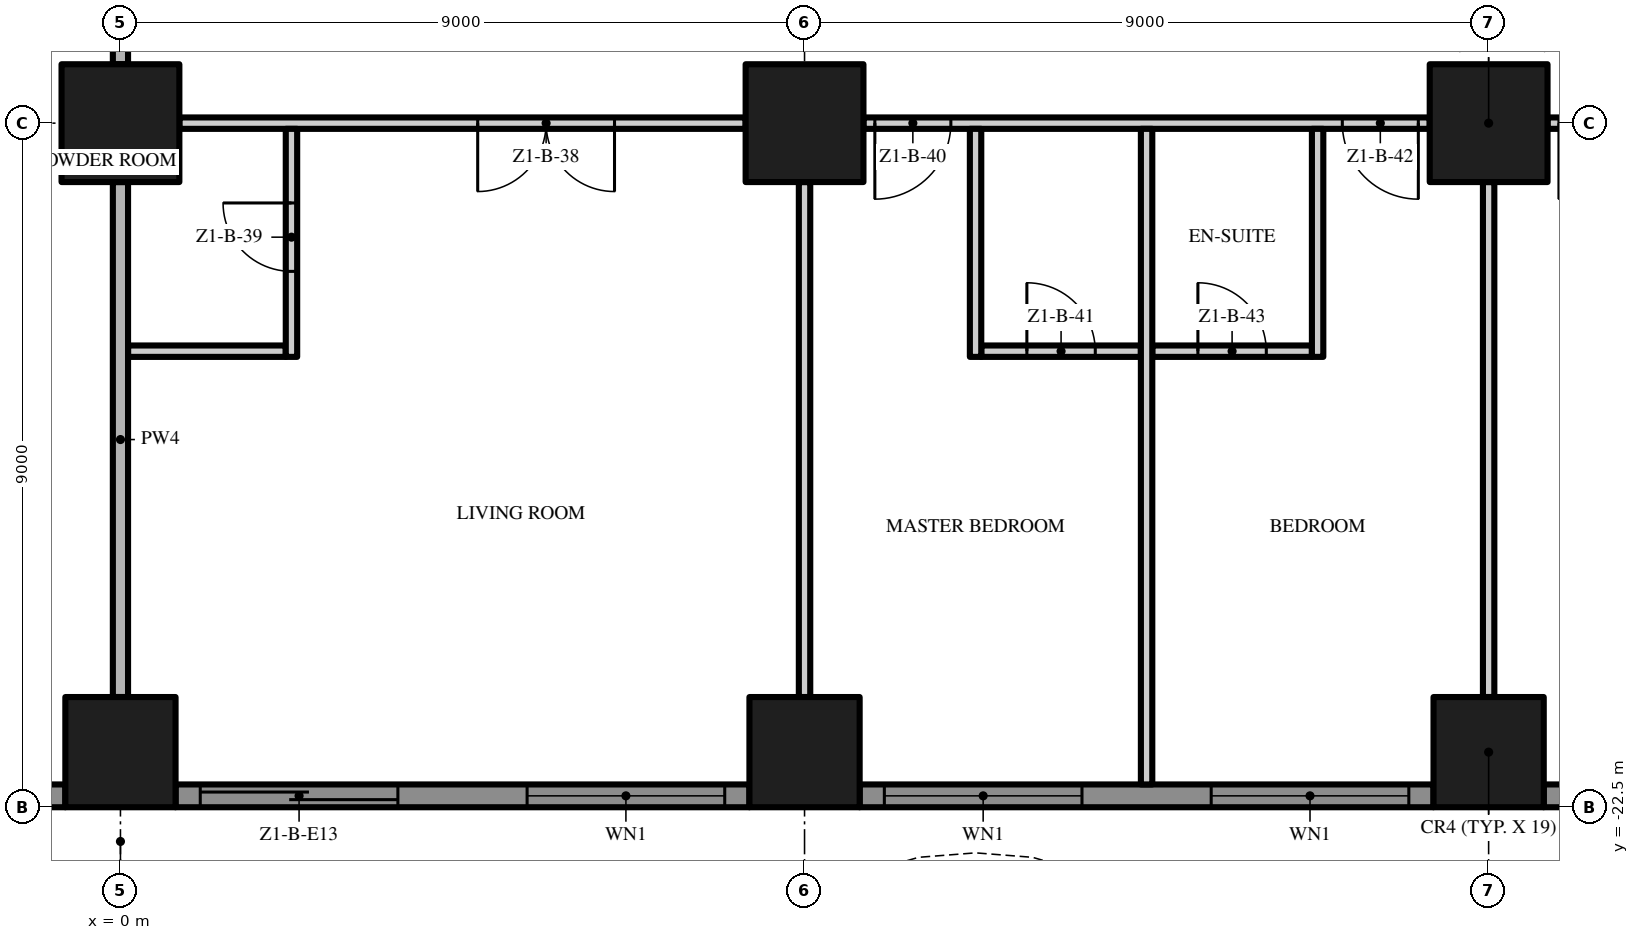
"""IFC4 building model, lengths in metres.
Left out: names, types, materials, properties, quantities, classifications, styles, units other than length and angle.
Written with IfcOpenShell. Run it as: python <this file> out.ifc"""

import sys

from ifc_helpers import new_model, si_unit, direction, frame, frame_2d, origin, origin_2d, place, context, subcontext, project, spatial, polyline, rectangle, outline, extrude, element, fill, save


model = new_model("IFC4")
c1 = context("Model", 3, precision=1e-05, world=origin(), true_north=direction((0.0, 1.0)))
c2 = subcontext(c1, "Body", "Model", "MODEL_VIEW")
j1 = project(units=[si_unit("LENGTHUNIT", "METRE"), si_unit("PLANEANGLEUNIT", "RADIAN")], contexts=[c1])
p1 = place(None, origin())
s1 = spatial("IfcSite", under=j1, at=p1, CompositionType="ELEMENT")
p2 = place(p1, origin())
s2 = spatial("IfcBuilding", under=s1, at=p2, CompositionType="ELEMENT")
p3 = place(p2, frame((0.0, 0.0, 30.2)))
s3 = spatial("IfcBuildingStorey", under=s2, at=p3, CompositionType="ELEMENT", Elevation=30.2)
p4 = place(p3, frame((0.0, -13.5, 0.0), z_axis=(0.0, 0.0, 1.0), x_axis=(1.0, 0.0, 0.0)))
e1 = element("IfcColumn", 1, at=p4, inside=s3, PredefinedType="COLUMN", context=c2, shape_type="SweptSolid", body=[
    extrude(rectangle(XDim=1.55, YDim=1.55, at=origin_2d()), origin(), (0.0, 0.0, 1.0), 3.5),
])
p5 = place(p3, frame((0.0, -21.775, 0.0), z_axis=(0.0, 0.0, 1.0), x_axis=(1.0, 0.0, 0.0)))
e2 = element("IfcColumn", 2, at=p5, inside=s3, PredefinedType="COLUMN", context=c2, shape_type="SweptSolid", body=[
    extrude(rectangle(XDim=1.45, YDim=1.45, at=origin_2d()), origin(), (0.0, 0.0, 1.0), 3.5),
])
p6 = place(p3, frame((18.0, -13.5, 0.0), z_axis=(0.0, 0.0, 1.0), x_axis=(1.0, 0.0, 0.0)))
e3 = element("IfcColumn", 3, at=p6, inside=s3, PredefinedType="COLUMN", context=c2, shape_type="SweptSolid", body=[
    extrude(rectangle(XDim=1.55, YDim=1.55, at=origin_2d()), origin(), (0.0, 0.0, 1.0), 3.5),
])
p7 = place(p3, frame((18.0, -21.775, 0.0), z_axis=(0.0, 0.0, 1.0), x_axis=(1.0, 0.0, 0.0)))
e4 = element("IfcColumn", 4, at=p7, inside=s3, PredefinedType="COLUMN", context=c2, shape_type="SweptSolid", body=[
    extrude(rectangle(XDim=1.45, YDim=1.45, at=origin_2d()), origin(), (0.0, 0.0, 1.0), 3.5),
])
p8 = place(p3, frame((9.0, -13.5, 0.0), z_axis=(0.0, 0.0, 1.0), x_axis=(1.0, 0.0, 0.0)))
e5 = element("IfcColumn", 5, at=p8, inside=s3, PredefinedType="COLUMN", context=c2, shape_type="SweptSolid", body=[
    extrude(rectangle(XDim=1.55, YDim=1.55, at=origin_2d()), origin(), (0.0, 0.0, 1.0), 3.5),
])
p9 = place(p3, frame((9.0, -21.775, 0.0), z_axis=(0.0, 0.0, 1.0), x_axis=(1.0, 0.0, 0.0)))
e6 = element("IfcColumn", 6, at=p9, inside=s3, PredefinedType="COLUMN", context=c2, shape_type="SweptSolid", body=[
    extrude(rectangle(XDim=1.45, YDim=1.45, at=origin_2d()), origin(), (0.0, 0.0, 1.0), 3.5),
])
p10 = place(p3, frame((-0.725, -22.35, 0.0), z_axis=(0.0, 0.0, 1.0), x_axis=(-1.0, 0.0, 0.0)))
e7 = element("IfcWall", 7, at=p10, inside=s3, PredefinedType="SOLIDWALL", context=c2, shape_type="SweptSolid", body=[
    extrude(rectangle(XDim=7.55, YDim=0.3, at=frame_2d((3.775, 0.0))), origin(), (0.0, 0.0, 1.0), 3.5),
])
p11 = place(p10, frame((4.625, 0.0, 0.45)))
e8 = element("IfcOpeningElement", 8, at=p11, cuts=e7, PredefinedType="OPENING", context=c2, shape_type="SweptSolid", body=[
    extrude(rectangle(XDim=2.6, YDim=2.65, at=frame_2d((1.3, 1.325))), frame((0.0, 0.16, 0.0), z_axis=(0.0, -1.0, 0.0), x_axis=(1.0, 0.0, 0.0)), (0.0, 0.0, 1.0), 0.32),
])
p12 = place(p10, frame((0.325, 0.0, 0.45)))
e9 = element("IfcOpeningElement", 9, at=p12, cuts=e7, PredefinedType="OPENING", context=c2, shape_type="SweptSolid", body=[
    extrude(rectangle(XDim=2.6, YDim=2.65, at=frame_2d((1.3, 1.325))), frame((0.0, 0.16, 0.0), z_axis=(0.0, -1.0, 0.0), x_axis=(1.0, 0.0, 0.0)), (0.0, 0.0, 1.0), 0.32),
])
p13 = place(p3, frame((8.275, -22.35, 0.0), z_axis=(0.0, 0.0, 1.0), x_axis=(-1.0, 0.0, 0.0)))
e10 = element("IfcWall", 10, at=p13, inside=s3, PredefinedType="SOLIDWALL", context=c2, shape_type="SweptSolid", body=[
    extrude(rectangle(XDim=7.55, YDim=0.3, at=frame_2d((3.775, 0.0))), origin(), (0.0, 0.0, 1.0), 3.5),
])
p14 = place(p13, frame((4.625, 0.0, 0.0)))
e11 = element("IfcOpeningElement", 11, at=p14, cuts=e10, PredefinedType="OPENING", context=c2, shape_type="SweptSolid", body=[
    extrude(rectangle(XDim=2.6, YDim=2.4, at=frame_2d((1.3, 1.2))), frame((0.0, 0.16, 0.0), z_axis=(0.0, -1.0, 0.0), x_axis=(1.0, 0.0, 0.0)), (0.0, 0.0, 1.0), 0.32),
])
p15 = place(p13, frame((0.325, 0.0, 0.45)))
e12 = element("IfcOpeningElement", 12, at=p15, cuts=e10, PredefinedType="OPENING", context=c2, shape_type="SweptSolid", body=[
    extrude(rectangle(XDim=2.6, YDim=2.65, at=frame_2d((1.3, 1.325))), frame((0.0, 0.16, 0.0), z_axis=(0.0, -1.0, 0.0), x_axis=(1.0, 0.0, 0.0)), (0.0, 0.0, 1.0), 0.32),
])
p16 = place(p3, frame((17.275, -22.35, 0.0), z_axis=(0.0, 0.0, 1.0), x_axis=(-1.0, 0.0, 0.0)))
e13 = element("IfcWall", 13, at=p16, inside=s3, PredefinedType="SOLIDWALL", context=c2, shape_type="SweptSolid", body=[
    extrude(rectangle(XDim=7.55, YDim=0.3, at=frame_2d((3.775, 0.0))), origin(), (0.0, 0.0, 1.0), 3.5),
])
p17 = place(p16, frame((4.625, 0.0, 0.45)))
e14 = element("IfcOpeningElement", 14, at=p17, cuts=e13, PredefinedType="OPENING", context=c2, shape_type="SweptSolid", body=[
    extrude(rectangle(XDim=2.6, YDim=2.65, at=frame_2d((1.3, 1.325))), frame((0.0, 0.16, 0.0), z_axis=(0.0, -1.0, 0.0), x_axis=(1.0, 0.0, 0.0)), (0.0, 0.0, 1.0), 0.32),
])
p18 = place(p16, frame((0.325, 0.0, 0.45)))
e15 = element("IfcOpeningElement", 15, at=p18, cuts=e13, PredefinedType="OPENING", context=c2, shape_type="SweptSolid", body=[
    extrude(rectangle(XDim=2.6, YDim=2.65, at=frame_2d((1.3, 1.325))), frame((0.0, 0.16, 0.0), z_axis=(0.0, -1.0, 0.0), x_axis=(1.0, 0.0, 0.0)), (0.0, 0.0, 1.0), 0.32),
])
p19 = place(p3, frame((22.5, -22.35, 0.0), z_axis=(0.0, 0.0, 1.0), x_axis=(-1.0, 0.0, 0.0)))
e16 = element("IfcWall", 16, at=p19, inside=s3, PredefinedType="SOLIDWALL", context=c2, shape_type="SweptSolid", body=[
    extrude(rectangle(XDim=3.775, YDim=0.3, at=frame_2d((1.887, 0.0))), origin(), (0.0, 0.0, 1.0), 3.5),
])
p20 = place(p19, frame((0.85, 0.0, 0.0)))
e17 = element("IfcOpeningElement", 17, at=p20, cuts=e16, PredefinedType="OPENING", context=c2, shape_type="SweptSolid", body=[
    extrude(rectangle(XDim=2.6, YDim=2.4, at=frame_2d((1.3, 1.2))), frame((0.0, 0.16, 0.0), z_axis=(0.0, -1.0, 0.0), x_axis=(1.0, 0.0, 0.0)), (0.0, 0.0, 1.0), 0.32),
])
p21 = place(p3, origin())
e18 = element("IfcWall", 18, at=p21, inside=s3, PredefinedType="USERDEFINED", context=c2, shape_type="SweptSolid", body=[
    extrude(outline(polyline([(-22.5, -24.3), (-21.0, -23.595), (-19.5, -23.159), (-18.75, -23.1), (-18.0, -23.159), (-16.5, -23.595), (-15.0, -24.3), (-13.5, -25.005), (-12.0, -25.441), (-11.25, -25.5), (-10.5, -25.441), (-9.0, -25.005), (-7.5, -24.3), (-6.0, -23.595), (-4.5, -23.159), (-3.75, -23.1), (-3.0, -23.159), (-1.5, -23.595), (0.0, -24.3), (1.5, -25.005), (3.0, -25.441), (3.75, -25.5), (4.5, -25.441), (6.0, -25.005), (7.5, -24.3), (9.0, -23.595), (10.5, -23.159), (11.25, -23.1), (12.0, -23.159), (13.5, -23.595), (15.0, -24.3), (16.5, -25.005), (18.0, -25.441), (18.75, -25.5), (19.5, -25.441), (21.0, -25.005), (22.5, -24.3), (22.394, -24.074), (20.911, -24.771), (19.455, -25.194), (18.75, -25.249), (18.045, -25.194), (16.589, -24.771), (15.106, -24.074), (13.589, -23.36), (12.045, -22.911), (11.25, -22.849), (10.455, -22.911), (8.911, -23.36), (7.394, -24.074), (5.911, -24.771), (4.455, -25.194), (3.75, -25.249), (3.045, -25.194), (1.589, -24.771), (0.106, -24.074), (-1.411, -23.36), (-2.955, -22.911), (-3.75, -22.849), (-4.545, -22.911), (-6.089, -23.36), (-7.606, -24.074), (-9.089, -24.771), (-10.545, -25.194), (-11.25, -25.249), (-11.955, -25.194), (-13.411, -24.771), (-14.894, -24.074), (-16.411, -23.36), (-17.955, -22.911), (-18.75, -22.849), (-19.545, -22.911), (-21.089, -23.36), (-22.606, -24.074), (-22.5, -24.3)])), origin(), (0.0, 0.0, 1.0), 0.9),
])
p22 = place(p3, frame((0.1, -16.5, 0.0), z_axis=(0.0, 0.0, 1.0), x_axis=(1.0, 0.0, 0.0)))
e19 = element("IfcWall", 19, at=p22, inside=s3, PredefinedType="PARTITIONING", context=c2, shape_type="SweptSolid", body=[
    extrude(rectangle(XDim=2.075, YDim=0.15, at=frame_2d((1.038, 0.0))), origin(), (0.0, 0.0, 1.0), 3.5),
])
p23 = place(p3, frame((11.325, -16.5, 0.0), z_axis=(0.0, 0.0, 1.0), x_axis=(1.0, 0.0, 0.0)))
e20 = element("IfcWall", 20, at=p23, inside=s3, PredefinedType="PARTITIONING", context=c2, shape_type="SweptSolid", body=[
    extrude(rectangle(XDim=2.1, YDim=0.15, at=frame_2d((1.05, 0.0))), origin(), (0.0, 0.0, 1.0), 3.5),
])
p24 = place(p23, frame((0.6, 0.0, 0.0)))
e21 = element("IfcOpeningElement", 21, at=p24, cuts=e20, PredefinedType="OPENING", context=c2, shape_type="SweptSolid", body=[
    extrude(rectangle(XDim=0.9, YDim=2.1, at=frame_2d((0.45, 1.05))), frame((0.0, 0.085, 0.0), z_axis=(0.0, -1.0, 0.0), x_axis=(1.0, 0.0, 0.0)), (0.0, 0.0, 1.0), 0.17),
])
p25 = place(p3, frame((13.575, -16.5, 0.0), z_axis=(0.0, 0.0, 1.0), x_axis=(1.0, 0.0, 0.0)))
e22 = element("IfcWall", 22, at=p25, inside=s3, PredefinedType="PARTITIONING", context=c2, shape_type="SweptSolid", body=[
    extrude(rectangle(XDim=2.1, YDim=0.15, at=frame_2d((1.05, 0.0))), origin(), (0.0, 0.0, 1.0), 3.5),
])
p26 = place(p25, frame((0.6, 0.0, 0.0)))
e23 = element("IfcOpeningElement", 23, at=p26, cuts=e22, PredefinedType="OPENING", context=c2, shape_type="SweptSolid", body=[
    extrude(rectangle(XDim=0.9, YDim=2.1, at=frame_2d((0.45, 1.05))), frame((0.0, 0.085, 0.0), z_axis=(0.0, -1.0, 0.0), x_axis=(1.0, 0.0, 0.0)), (0.0, 0.0, 1.0), 0.17),
])
p27 = place(p3, frame((8.225, -13.5, 0.0), z_axis=(0.0, 0.0, 1.0), x_axis=(-1.0, 0.0, 0.0)))
e24 = element("IfcWall", 24, at=p27, inside=s3, PredefinedType="PARTITIONING", context=c2, shape_type="SweptSolid", body=[
    extrude(rectangle(XDim=7.45, YDim=0.15, at=frame_2d((3.725, 0.0))), origin(), (0.0, 0.0, 1.0), 3.5),
])
p28 = place(p27, frame((1.725, 0.0, 0.0)))
e25 = element("IfcOpeningElement", 25, at=p28, cuts=e24, PredefinedType="OPENING", context=c2, shape_type="SweptSolid", body=[
    extrude(rectangle(XDim=1.8, YDim=2.4, at=frame_2d((0.9, 1.2))), frame((0.0, 0.085, 0.0), z_axis=(0.0, -1.0, 0.0), x_axis=(1.0, 0.0, 0.0)), (0.0, 0.0, 1.0), 0.17),
])
p29 = place(p3, frame((17.225, -13.5, 0.0), z_axis=(0.0, 0.0, 1.0), x_axis=(-1.0, 0.0, 0.0)))
e26 = element("IfcWall", 26, at=p29, inside=s3, PredefinedType="PARTITIONING", context=c2, shape_type="SweptSolid", body=[
    extrude(rectangle(XDim=7.45, YDim=0.15, at=frame_2d((3.725, 0.0))), origin(), (0.0, 0.0, 1.0), 3.5),
])
p30 = place(p29, frame((6.3, 0.0, 0.0)))
e27 = element("IfcOpeningElement", 27, at=p30, cuts=e26, PredefinedType="OPENING", context=c2, shape_type="SweptSolid", body=[
    extrude(rectangle(XDim=1.0, YDim=2.4, at=frame_2d((0.5, 1.2))), frame((0.0, 0.085, 0.0), z_axis=(0.0, -1.0, 0.0), x_axis=(1.0, 0.0, 0.0)), (0.0, 0.0, 1.0), 0.17),
])
p31 = place(p29, frame((0.15, 0.0, 0.0)))
e28 = element("IfcOpeningElement", 28, at=p31, cuts=e26, PredefinedType="OPENING", context=c2, shape_type="SweptSolid", body=[
    extrude(rectangle(XDim=1.0, YDim=2.4, at=frame_2d((0.5, 1.2))), frame((0.0, 0.085, 0.0), z_axis=(0.0, -1.0, 0.0), x_axis=(1.0, 0.0, 0.0)), (0.0, 0.0, 1.0), 0.17),
])
p32 = place(p3, frame((25.55, -13.5, 0.0), z_axis=(0.0, 0.0, 1.0), x_axis=(-1.0, 0.0, 0.0)))
e29 = element("IfcWall", 29, at=p32, inside=s3, PredefinedType="PARTITIONING", context=c2, shape_type="SweptSolid", body=[
    extrude(rectangle(XDim=6.775, YDim=0.15, at=frame_2d((3.388, 0.0))), origin(), (0.0, 0.0, 1.0), 3.5),
])
p33 = place(p32, frame((5.625, 0.0, 0.0)))
e30 = element("IfcOpeningElement", 30, at=p33, cuts=e29, PredefinedType="OPENING", context=c2, shape_type="SweptSolid", body=[
    extrude(rectangle(XDim=1.0, YDim=2.4, at=frame_2d((0.5, 1.2))), frame((0.0, 0.085, 0.0), z_axis=(0.0, -1.0, 0.0), x_axis=(1.0, 0.0, 0.0)), (0.0, 0.0, 1.0), 0.17),
])
p34 = place(p32, frame((0.15, 0.0, 0.0)))
e31 = element("IfcOpeningElement", 31, at=p34, cuts=e29, PredefinedType="OPENING", context=c2, shape_type="SweptSolid", body=[
    extrude(rectangle(XDim=1.5, YDim=2.4, at=frame_2d((0.75, 1.2))), frame((0.0, 0.085, 0.0), z_axis=(0.0, -1.0, 0.0), x_axis=(1.0, 0.0, 0.0)), (0.0, 0.0, 1.0), 0.17),
])
p35 = place(p3, frame((0.0, -21.05, 0.0), z_axis=(0.0, 0.0, 1.0), x_axis=(0.0, 1.0, 0.0)))
e32 = element("IfcWall", 32, at=p35, inside=s3, PredefinedType="PARTITIONING", context=c2, shape_type="SweptSolid", body=[
    extrude(rectangle(XDim=6.775, YDim=0.2, at=frame_2d((3.388, 0.0))), origin(), (0.0, 0.0, 1.0), 3.5),
])
p36 = place(p3, frame((0.0, -12.725, 0.0), z_axis=(0.0, 0.0, 1.0), x_axis=(0.0, 1.0, 0.0)))
e33 = element("IfcWall", 33, at=p36, inside=s3, PredefinedType="PARTITIONING", context=c2, shape_type="SweptSolid", body=[
    extrude(rectangle(XDim=7.45, YDim=0.2, at=frame_2d((3.725, 0.0))), origin(), (0.0, 0.0, 1.0), 3.5),
])
p37 = place(p3, frame((2.25, -16.575, 0.0), z_axis=(0.0, 0.0, 1.0), x_axis=(0.0, 1.0, 0.0)))
e34 = element("IfcWall", 34, at=p37, inside=s3, PredefinedType="PARTITIONING", context=c2, shape_type="SweptSolid", body=[
    extrude(rectangle(XDim=3.0, YDim=0.15, at=frame_2d((1.5, 0.0))), origin(), (0.0, 0.0, 1.0), 3.5),
])
p38 = place(p37, frame((1.125, 0.0, 0.0)))
e35 = element("IfcOpeningElement", 35, at=p38, cuts=e34, PredefinedType="OPENING", context=c2, shape_type="SweptSolid", body=[
    extrude(rectangle(XDim=0.9, YDim=2.1, at=frame_2d((0.45, 1.05))), frame((0.0, 0.085, 0.0), z_axis=(0.0, -1.0, 0.0), x_axis=(1.0, 0.0, 0.0)), (0.0, 0.0, 1.0), 0.17),
])
p39 = place(p3, frame((9.0, -21.05, 0.0), z_axis=(0.0, 0.0, 1.0), x_axis=(0.0, 1.0, 0.0)))
e36 = element("IfcWall", 36, at=p39, inside=s3, PredefinedType="PARTITIONING", context=c2, shape_type="SweptSolid", body=[
    extrude(rectangle(XDim=6.775, YDim=0.15, at=frame_2d((3.388, 0.0))), origin(), (0.0, 0.0, 1.0), 3.5),
])
p40 = place(p3, frame((11.25, -16.575, 0.0), z_axis=(0.0, 0.0, 1.0), x_axis=(0.0, 1.0, 0.0)))
e37 = element("IfcWall", 37, at=p40, inside=s3, PredefinedType="PARTITIONING", context=c2, shape_type="SweptSolid", body=[
    extrude(rectangle(XDim=3.0, YDim=0.15, at=frame_2d((1.5, 0.0))), origin(), (0.0, 0.0, 1.0), 3.5),
])
p41 = place(p3, frame((13.5, -22.2, 0.0), z_axis=(0.0, 0.0, 1.0), x_axis=(0.0, 1.0, 0.0)))
e38 = element("IfcWall", 38, at=p41, inside=s3, PredefinedType="PARTITIONING", context=c2, shape_type="SweptSolid", body=[
    extrude(rectangle(XDim=8.625, YDim=0.15, at=frame_2d((4.312, 0.0))), origin(), (0.0, 0.0, 1.0), 3.5),
])
p42 = place(p3, frame((15.75, -16.575, 0.0), z_axis=(0.0, 0.0, 1.0), x_axis=(0.0, 1.0, 0.0)))
e39 = element("IfcWall", 39, at=p42, inside=s3, PredefinedType="PARTITIONING", context=c2, shape_type="SweptSolid", body=[
    extrude(rectangle(XDim=3.0, YDim=0.15, at=frame_2d((1.5, 0.0))), origin(), (0.0, 0.0, 1.0), 3.5),
])
p43 = place(p3, frame((18.0, -21.05, 0.0), z_axis=(0.0, 0.0, 1.0), x_axis=(0.0, 1.0, 0.0)))
e40 = element("IfcWall", 40, at=p43, inside=s3, PredefinedType="PARTITIONING", context=c2, shape_type="SweptSolid", body=[
    extrude(rectangle(XDim=6.775, YDim=0.15, at=frame_2d((3.388, 0.0))), origin(), (0.0, 0.0, 1.0), 3.5),
])
p44 = place(p14, origin())
e41 = element("IfcDoor", 41, at=p44, inside=s3, OperationType="SINGLE_SWING_LEFT", PredefinedType="DOOR", context=c2, shape_type="SweptSolid", body=[
    extrude(rectangle(XDim=2.6, YDim=2.4, at=frame_2d((1.3, 1.2))), frame((0.0, 0.025, 0.0), z_axis=(0.0, -1.0, 0.0), x_axis=(1.0, 0.0, 0.0)), (0.0, 0.0, 1.0), 0.05),
])
fill(e11, e41)
p45 = place(p15, origin())
e42 = element("IfcWindow", 42, at=p45, inside=s3, PartitioningType="SINGLE_PANEL", PredefinedType="WINDOW", context=c2, shape_type="SweptSolid", body=[
    extrude(rectangle(XDim=2.6, YDim=2.65, at=frame_2d((1.3, 1.325))), frame((0.0, 0.03, 0.0), z_axis=(0.0, -1.0, 0.0), x_axis=(1.0, 0.0, 0.0)), (0.0, 0.0, 1.0), 0.06),
])
fill(e12, e42)
p46 = place(p17, origin())
e43 = element("IfcWindow", 43, at=p46, inside=s3, PartitioningType="SINGLE_PANEL", PredefinedType="WINDOW", context=c2, shape_type="SweptSolid", body=[
    extrude(rectangle(XDim=2.6, YDim=2.65, at=frame_2d((1.3, 1.325))), frame((0.0, 0.03, 0.0), z_axis=(0.0, -1.0, 0.0), x_axis=(1.0, 0.0, 0.0)), (0.0, 0.0, 1.0), 0.06),
])
fill(e14, e43)
p47 = place(p18, origin())
e44 = element("IfcWindow", 44, at=p47, inside=s3, PartitioningType="SINGLE_PANEL", PredefinedType="WINDOW", context=c2, shape_type="SweptSolid", body=[
    extrude(rectangle(XDim=2.6, YDim=2.65, at=frame_2d((1.3, 1.325))), frame((0.0, 0.03, 0.0), z_axis=(0.0, -1.0, 0.0), x_axis=(1.0, 0.0, 0.0)), (0.0, 0.0, 1.0), 0.06),
])
fill(e15, e44)
p48 = place(p28, origin())
e45 = element("IfcDoor", 45, at=p48, inside=s3, OperationType="DOUBLE_DOOR_SINGLE_SWING", PredefinedType="DOOR", context=c2, shape_type="SweptSolid", body=[
    extrude(rectangle(XDim=1.8, YDim=2.4, at=frame_2d((0.9, 1.2))), frame((0.0, 0.025, 0.0), z_axis=(0.0, -1.0, 0.0), x_axis=(1.0, 0.0, 0.0)), (0.0, 0.0, 1.0), 0.05),
])
fill(e25, e45)
p49 = place(p38, origin())
e46 = element("IfcDoor", 46, at=p49, inside=s3, OperationType="SINGLE_SWING_RIGHT", PredefinedType="DOOR", context=c2, shape_type="SweptSolid", body=[
    extrude(rectangle(XDim=0.9, YDim=2.1, at=frame_2d((0.45, 1.05))), frame((0.0, 0.025, 0.0), z_axis=(0.0, -1.0, 0.0), x_axis=(1.0, 0.0, 0.0)), (0.0, 0.0, 1.0), 0.05),
])
fill(e35, e46)
p50 = place(p30, origin())
e47 = element("IfcDoor", 47, at=p50, inside=s3, OperationType="SINGLE_SWING_RIGHT", PredefinedType="DOOR", context=c2, shape_type="SweptSolid", body=[
    extrude(rectangle(XDim=1.0, YDim=2.4, at=frame_2d((0.5, 1.2))), frame((0.0, 0.025, 0.0), z_axis=(0.0, -1.0, 0.0), x_axis=(1.0, 0.0, 0.0)), (0.0, 0.0, 1.0), 0.05),
])
fill(e27, e47)
p51 = place(p24, origin())
e48 = element("IfcDoor", 48, at=p51, inside=s3, OperationType="SINGLE_SWING_LEFT", PredefinedType="DOOR", context=c2, shape_type="SweptSolid", body=[
    extrude(rectangle(XDim=0.9, YDim=2.1, at=frame_2d((0.45, 1.05))), frame((0.0, 0.025, 0.0), z_axis=(0.0, -1.0, 0.0), x_axis=(1.0, 0.0, 0.0)), (0.0, 0.0, 1.0), 0.05),
])
fill(e21, e48)
p52 = place(p31, origin())
e49 = element("IfcDoor", 49, at=p52, inside=s3, OperationType="SINGLE_SWING_LEFT", PredefinedType="DOOR", context=c2, shape_type="SweptSolid", body=[
    extrude(rectangle(XDim=1.0, YDim=2.4, at=frame_2d((0.5, 1.2))), frame((0.0, 0.025, 0.0), z_axis=(0.0, -1.0, 0.0), x_axis=(1.0, 0.0, 0.0)), (0.0, 0.0, 1.0), 0.05),
])
fill(e28, e49)
p53 = place(p26, origin())
e50 = element("IfcDoor", 50, at=p53, inside=s3, OperationType="SINGLE_SWING_LEFT", PredefinedType="DOOR", context=c2, shape_type="SweptSolid", body=[
    extrude(rectangle(XDim=0.9, YDim=2.1, at=frame_2d((0.45, 1.05))), frame((0.0, 0.025, 0.0), z_axis=(0.0, -1.0, 0.0), x_axis=(1.0, 0.0, 0.0)), (0.0, 0.0, 1.0), 0.05),
])
fill(e23, e50)
save(model, sys.argv[1])
